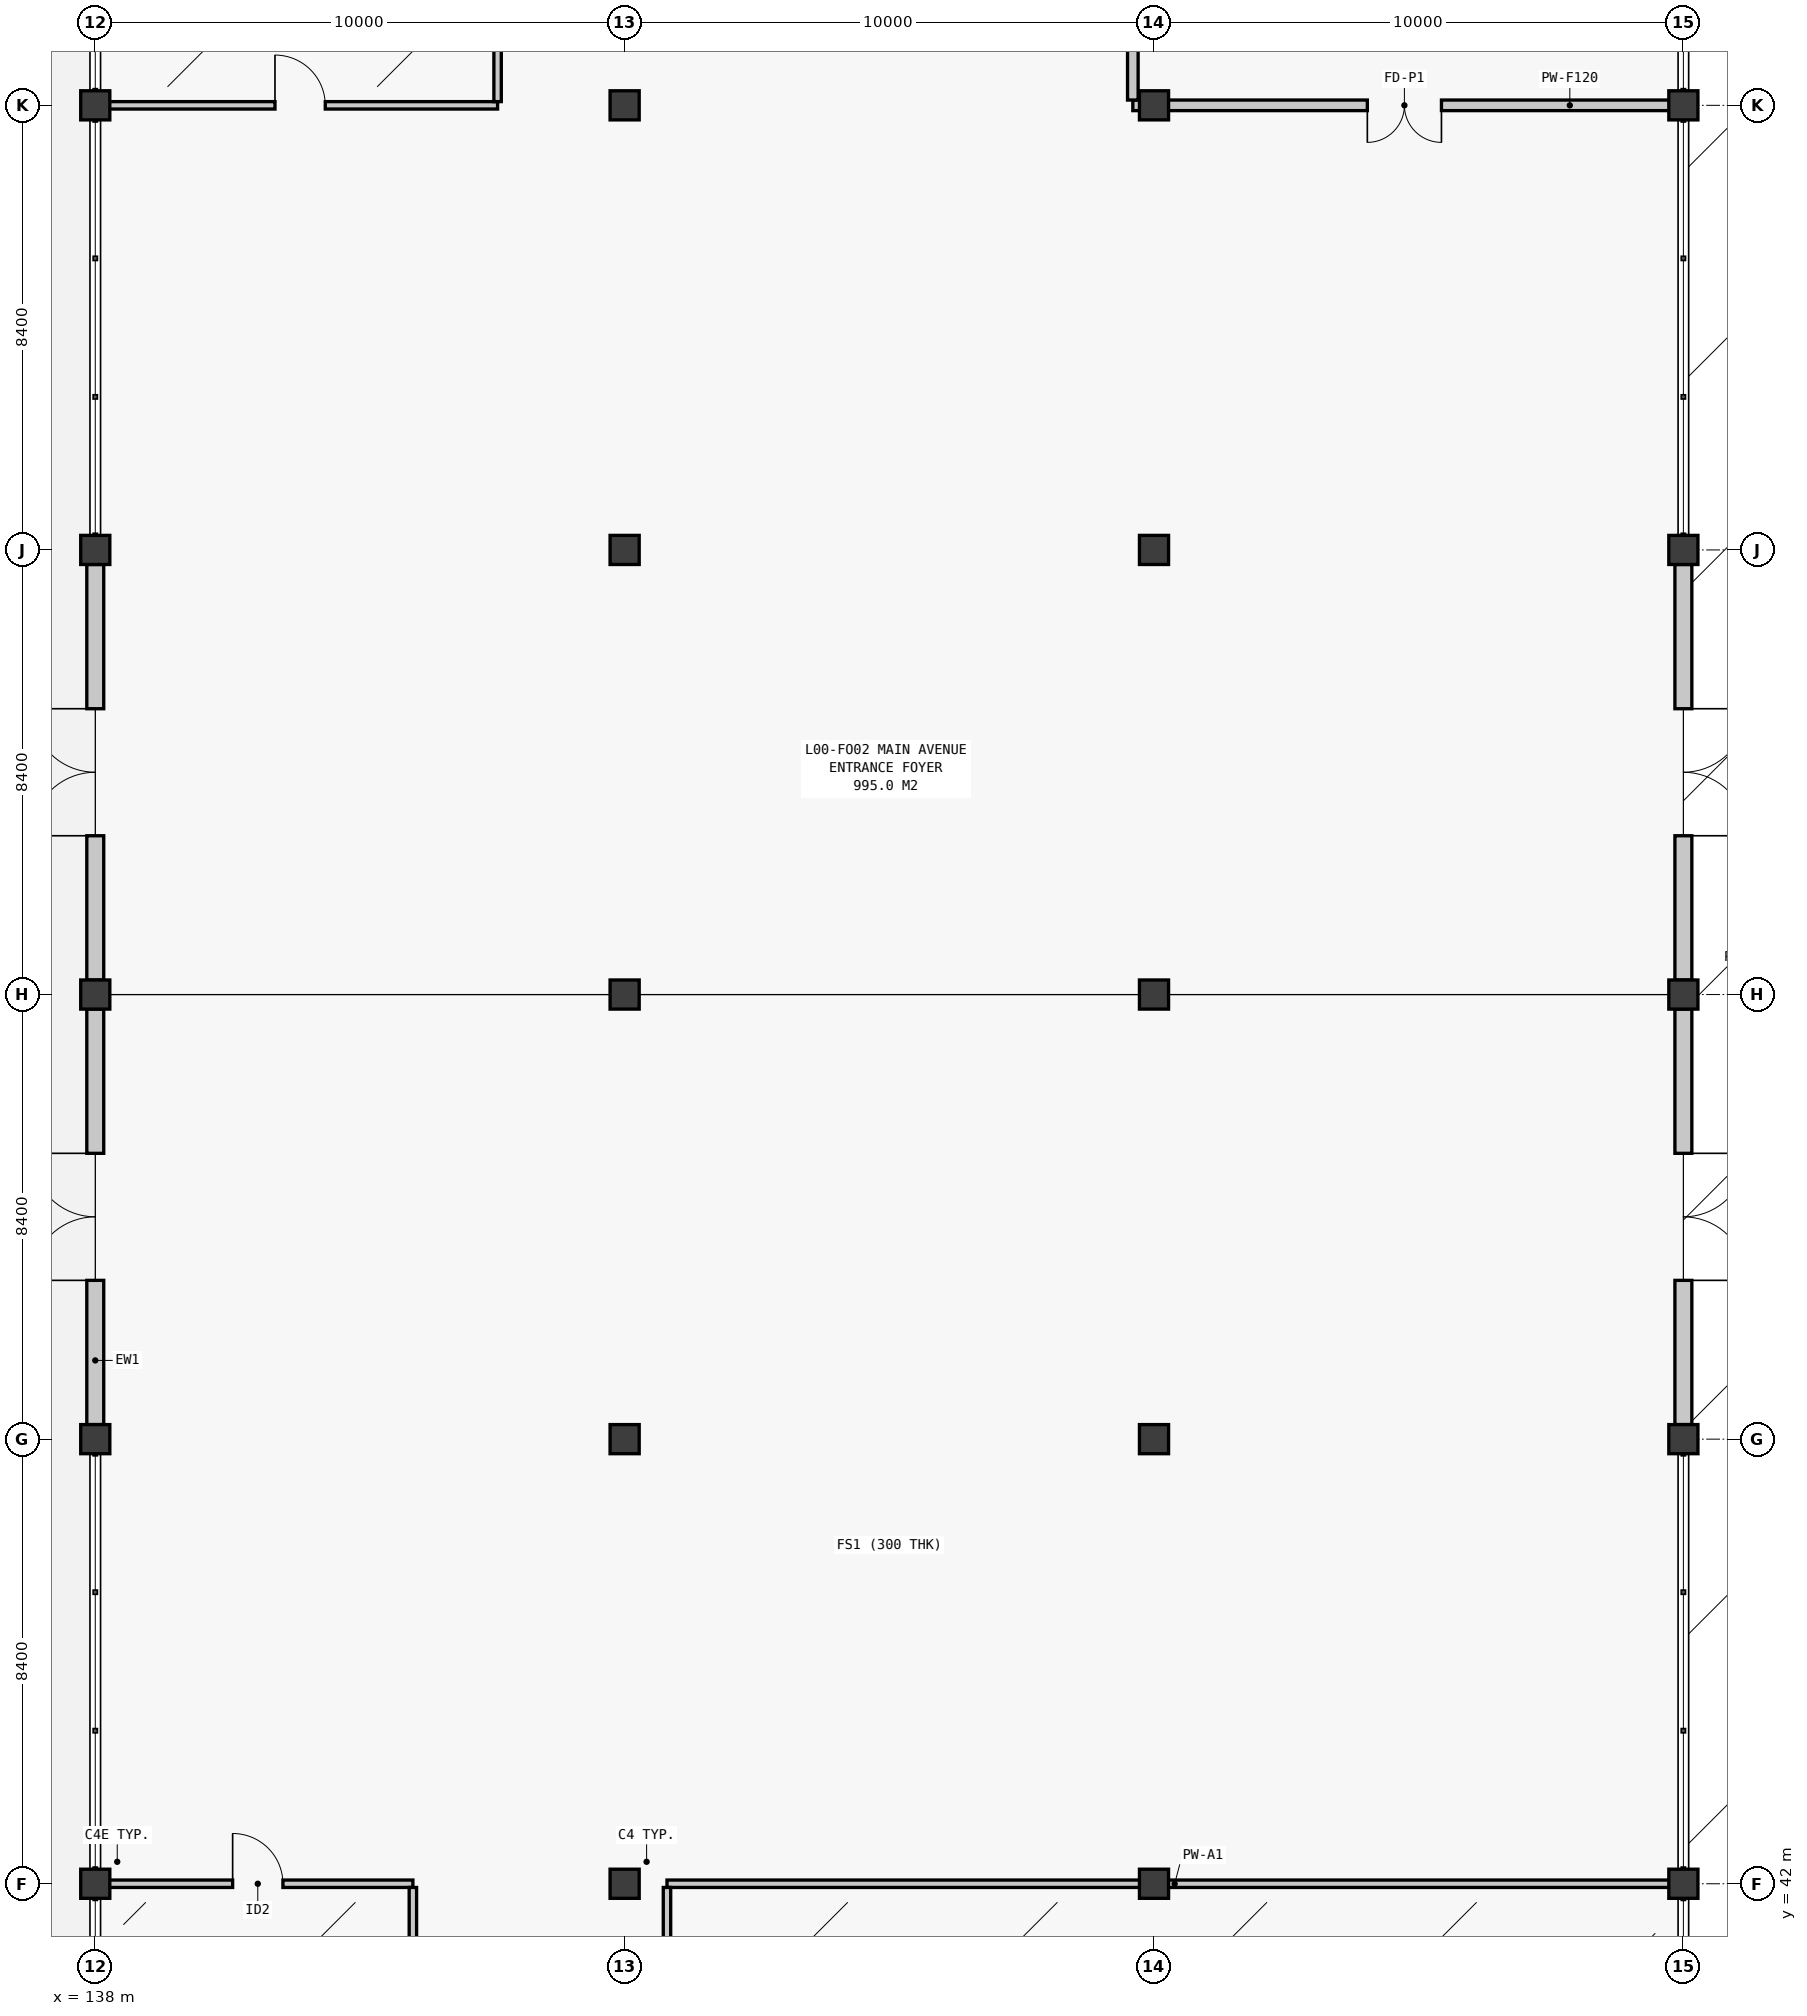
"""IFC4 building model, lengths in metres.
Left out: names, types, materials, properties, quantities, classifications, styles, units other than length and angle.
Written with IfcOpenShell. Run it as: python <this file> out.ifc"""

import sys

from ifc_helpers import new_model, si_unit, direction, frame, frame_2d, origin, origin_2d, place, context, subcontext, project, spatial, rectangle, extrude, element, fill, save


model = new_model("IFC4")
c1 = context("Model", 3, precision=1e-05, world=origin(), true_north=direction((0.0, 1.0)))
c2 = subcontext(c1, "Body", "Model", "MODEL_VIEW")
j1 = project(units=[si_unit("LENGTHUNIT", "METRE"), si_unit("PLANEANGLEUNIT", "RADIAN")], contexts=[c1])
p1 = place(None, origin())
s1 = spatial("IfcSite", under=j1, at=p1, CompositionType="ELEMENT")
p2 = place(p1, origin())
s2 = spatial("IfcBuilding", under=s1, at=p2, CompositionType="ELEMENT")
p3 = place(p2, origin())
s3 = spatial("IfcBuildingStorey", under=s2, at=p3, CompositionType="ELEMENT", Elevation=0.0)
for number, where, z_axis, x_axis in (
    (1, (138.0, 42.0, 0.0), (0.0, 0.0, 1.0), (1.0, 0.0, 0.0)),
    (2, (138.0, 50.4, 0.0), (0.0, 0.0, 1.0), (1.0, 0.0, 0.0)),
    (3, (138.0, 58.8, 0.0), (0.0, 0.0, 1.0), (1.0, 0.0, 0.0)),
    (4, (138.0, 67.2, 0.0), (0.0, 0.0, 1.0), (1.0, 0.0, 0.0)),
    (5, (138.0, 75.6, 0.0), (0.0, 0.0, 1.0), (1.0, 0.0, 0.0)),
    (6, (148.0, 42.0, 0.0), (0.0, 0.0, 1.0), (1.0, 0.0, 0.0)),
    (7, (148.0, 50.4, 0.0), (0.0, 0.0, 1.0), (1.0, 0.0, 0.0)),
    (8, (148.0, 58.8, 0.0), (0.0, 0.0, 1.0), (1.0, 0.0, 0.0)),
    (9, (148.0, 67.2, 0.0), (0.0, 0.0, 1.0), (1.0, 0.0, 0.0)),
    (10, (148.0, 75.6, 0.0), (0.0, 0.0, 1.0), (1.0, 0.0, 0.0)),
    (11, (158.0, 42.0, 0.0), (0.0, 0.0, 1.0), (1.0, 0.0, 0.0)),
    (12, (158.0, 50.4, 0.0), (0.0, 0.0, 1.0), (1.0, 0.0, 0.0)),
    (13, (158.0, 58.8, 0.0), (0.0, 0.0, 1.0), (1.0, 0.0, 0.0)),
    (14, (158.0, 67.2, 0.0), (0.0, 0.0, 1.0), (1.0, 0.0, 0.0)),
    (15, (158.0, 75.6, 0.0), (0.0, 0.0, 1.0), (1.0, 0.0, 0.0)),
    (16, (168.0, 42.0, 0.0), (0.0, 0.0, 1.0), (1.0, 0.0, 0.0)),
    (17, (168.0, 50.4, 0.0), (0.0, 0.0, 1.0), (1.0, 0.0, 0.0)),
    (18, (168.0, 58.8, 0.0), (0.0, 0.0, 1.0), (1.0, 0.0, 0.0)),
    (19, (168.0, 67.2, 0.0), (0.0, 0.0, 1.0), (1.0, 0.0, 0.0)),
    (20, (168.0, 75.6, 0.0), (0.0, 0.0, 1.0), (1.0, 0.0, 0.0)),
):
    element("IfcColumn", number, at=place(p3, frame(where, z_axis=z_axis, x_axis=x_axis)), inside=s3, PredefinedType="COLUMN", context=c2, shape_type="SweptSolid", body=[
        extrude(rectangle(XDim=0.55, YDim=0.55, at=origin_2d()), origin(), (0.0, 0.0, 1.0), 4.8),
    ])
p4 = place(p3, frame((138.0, 58.525, 0.0), z_axis=(0.0, 0.0, 1.0), x_axis=(0.0, -1.0, 0.0)))
e21 = element("IfcWall", 21, at=p4, inside=s3, PredefinedType="STANDARD", context=c2, shape_type="SweptSolid", body=[
    extrude(rectangle(XDim=7.85, YDim=0.32, at=frame_2d((3.925, 0.0))), origin(), (0.0, 0.0, 1.0), 3.976),
])
p5 = place(p4, frame((2.725, 0.0, 0.0)))
e22 = element("IfcOpeningElement", 22, at=p5, cuts=e21, PredefinedType="OPENING", context=c2, shape_type="SweptSolid", body=[
    extrude(rectangle(XDim=2.4, YDim=2.4, at=frame_2d((1.2, 1.2))), frame((0.0, 0.175, 0.0), z_axis=(0.0, -1.0, 0.0), x_axis=(1.0, 0.0, 0.0)), (0.0, 0.0, 1.0), 0.35),
])
p6 = place(p3, frame((168.0, 50.675, 0.0), z_axis=(0.0, 0.0, 1.0), x_axis=(0.0, 1.0, 0.0)))
e23 = element("IfcWall", 23, at=p6, inside=s3, PredefinedType="STANDARD", context=c2, shape_type="SweptSolid", body=[
    extrude(rectangle(XDim=7.85, YDim=0.32, at=frame_2d((3.925, 0.0))), origin(), (0.0, 0.0, 1.0), 3.976),
])
p7 = place(p6, frame((2.725, 0.0, 0.0)))
e24 = element("IfcOpeningElement", 24, at=p7, cuts=e23, PredefinedType="OPENING", context=c2, shape_type="SweptSolid", body=[
    extrude(rectangle(XDim=2.4, YDim=2.4, at=frame_2d((1.2, 1.2))), frame((0.0, 0.175, 0.0), z_axis=(0.0, -1.0, 0.0), x_axis=(1.0, 0.0, 0.0)), (0.0, 0.0, 1.0), 0.35),
])
p8 = place(p3, frame((138.0, 66.925, 0.0), z_axis=(0.0, 0.0, 1.0), x_axis=(0.0, -1.0, 0.0)))
e25 = element("IfcWall", 25, at=p8, inside=s3, PredefinedType="STANDARD", context=c2, shape_type="SweptSolid", body=[
    extrude(rectangle(XDim=7.85, YDim=0.32, at=frame_2d((3.925, 0.0))), origin(), (0.0, 0.0, 1.0), 3.976),
])
p9 = place(p8, frame((2.725, 0.0, 0.0)))
e26 = element("IfcOpeningElement", 26, at=p9, cuts=e25, PredefinedType="OPENING", context=c2, shape_type="SweptSolid", body=[
    extrude(rectangle(XDim=2.4, YDim=2.4, at=frame_2d((1.2, 1.2))), frame((0.0, 0.175, 0.0), z_axis=(0.0, -1.0, 0.0), x_axis=(1.0, 0.0, 0.0)), (0.0, 0.0, 1.0), 0.35),
])
p10 = place(p3, frame((168.0, 59.075, 0.0), z_axis=(0.0, 0.0, 1.0), x_axis=(0.0, 1.0, 0.0)))
e27 = element("IfcWall", 27, at=p10, inside=s3, PredefinedType="STANDARD", context=c2, shape_type="SweptSolid", body=[
    extrude(rectangle(XDim=7.85, YDim=0.32, at=frame_2d((3.925, 0.0))), origin(), (0.0, 0.0, 1.0), 3.976),
])
p11 = place(p10, frame((2.725, 0.0, 0.0)))
e28 = element("IfcOpeningElement", 28, at=p11, cuts=e27, PredefinedType="OPENING", context=c2, shape_type="SweptSolid", body=[
    extrude(rectangle(XDim=2.4, YDim=2.4, at=frame_2d((1.2, 1.2))), frame((0.0, 0.175, 0.0), z_axis=(0.0, -1.0, 0.0), x_axis=(1.0, 0.0, 0.0)), (0.0, 0.0, 1.0), 0.35),
])
p12 = place(p3, frame((138.02, 42.0, 0.0), z_axis=(0.0, 0.0, 1.0), x_axis=(1.0, 0.0, 0.0)))
e29 = element("IfcWall", 29, at=p12, inside=s3, PredefinedType="PARTITIONING", context=c2, shape_type="SweptSolid", body=[
    extrude(rectangle(XDim=5.98, YDim=0.14, at=frame_2d((2.99, 0.0))), origin(), (0.0, 0.0, 1.0), 3.904),
])
p13 = place(p12, frame((2.575, 0.0, 0.0)))
e30 = element("IfcOpeningElement", 30, at=p13, cuts=e29, PredefinedType="OPENING", context=c2, shape_type="SweptSolid", body=[
    extrude(rectangle(XDim=0.95, YDim=2.15, at=frame_2d((0.475, 1.075))), frame((0.0, 0.085, 0.0), z_axis=(0.0, -1.0, 0.0), x_axis=(1.0, 0.0, 0.0)), (0.0, 0.0, 1.0), 0.17),
])
p14 = place(p3, frame((144.0, 25.36, 0.0), z_axis=(0.0, 0.0, 1.0), x_axis=(0.0, 1.0, 0.0)))
e31 = element("IfcWall", 31, at=p14, inside=s3, PredefinedType="PARTITIONING", context=c2, shape_type="SweptSolid", body=[
    extrude(rectangle(XDim=16.57, YDim=0.14, at=frame_2d((8.285, 0.0))), origin(), (0.0, 0.0, 1.0), 3.904),
])
p15 = place(p3, frame((148.8, 42.0, 0.0), z_axis=(0.0, 0.0, 1.0), x_axis=(1.0, 0.0, 0.0)))
e32 = element("IfcWall", 32, at=p15, inside=s3, PredefinedType="PARTITIONING", context=c2, shape_type="SweptSolid", body=[
    extrude(rectangle(XDim=19.18, YDim=0.14, at=frame_2d((9.59, 0.0))), origin(), (0.0, 0.0, 1.0), 3.904),
])
p16 = place(p3, frame((148.8, 35.27, 0.0), z_axis=(0.0, 0.0, 1.0), x_axis=(0.0, 1.0, 0.0)))
e33 = element("IfcWall", 33, at=p16, inside=s3, PredefinedType="PARTITIONING", context=c2, shape_type="SweptSolid", body=[
    extrude(rectangle(XDim=6.66, YDim=0.14, at=frame_2d((3.33, 0.0))), origin(), (0.0, 0.0, 1.0), 4.52),
])
p17 = place(p3, frame((138.02, 75.6, 0.0), z_axis=(0.0, 0.0, 1.0), x_axis=(1.0, 0.0, 0.0)))
e34 = element("IfcWall", 34, at=p17, inside=s3, PredefinedType="PARTITIONING", context=c2, shape_type="SweptSolid", body=[
    extrude(rectangle(XDim=7.58, YDim=0.14, at=frame_2d((3.79, 0.0))), origin(), (0.0, 0.0, 1.0), 3.904),
])
p18 = place(p17, frame((3.375, 0.0, 0.0)))
e35 = element("IfcOpeningElement", 35, at=p18, cuts=e34, PredefinedType="OPENING", context=c2, shape_type="SweptSolid", body=[
    extrude(rectangle(XDim=0.95, YDim=2.15, at=frame_2d((0.475, 1.075))), frame((0.0, 0.085, 0.0), z_axis=(0.0, -1.0, 0.0), x_axis=(1.0, 0.0, 0.0)), (0.0, 0.0, 1.0), 0.17),
])
p19 = place(p3, frame((145.6, 75.67, 0.0), z_axis=(0.0, 0.0, 1.0), x_axis=(0.0, 1.0, 0.0)))
e36 = element("IfcWall", 36, at=p19, inside=s3, PredefinedType="PARTITIONING", context=c2, shape_type="SweptSolid", body=[
    extrude(rectangle(XDim=16.57, YDim=0.14, at=frame_2d((8.285, 0.0))), origin(), (0.0, 0.0, 1.0), 3.904),
])
p20 = place(p3, frame((157.6, 75.6, 0.0), z_axis=(0.0, 0.0, 1.0), x_axis=(1.0, 0.0, 0.0)))
e37 = element("IfcWall", 37, at=p20, inside=s3, PredefinedType="PARTITIONING", context=c2, shape_type="SweptSolid", body=[
    extrude(rectangle(XDim=10.38, YDim=0.2, at=frame_2d((5.19, 0.0))), origin(), (0.0, 0.0, 1.0), 3.904),
])
p21 = place(p20, frame((4.43, 0.0, 0.0)))
e38 = element("IfcOpeningElement", 38, at=p21, cuts=e37, PredefinedType="OPENING", context=c2, shape_type="SweptSolid", body=[
    extrude(rectangle(XDim=1.4, YDim=2.2, at=frame_2d((0.7, 1.1))), frame((0.0, 0.115, 0.0), z_axis=(0.0, -1.0, 0.0), x_axis=(1.0, 0.0, 0.0)), (0.0, 0.0, 1.0), 0.23),
])
p22 = place(p3, frame((157.6, 75.7, 0.0), z_axis=(0.0, 0.0, 1.0), x_axis=(0.0, 1.0, 0.0)))
e39 = element("IfcWall", 39, at=p22, inside=s3, PredefinedType="PARTITIONING", context=c2, shape_type="SweptSolid", body=[
    extrude(rectangle(XDim=10.08, YDim=0.2, at=frame_2d((5.04, 0.0))), origin(), (0.0, 0.0, 1.0), 3.904),
])
p23 = place(p5, frame((2.4, 0.0, 0.0), z_axis=(0.0, 0.0, 1.0), x_axis=(-1.0, 0.0, 0.0)))
e40 = element("IfcDoor", 40, at=p23, inside=s3, OperationType="DOUBLE_DOOR_SINGLE_SWING", PredefinedType="DOOR", context=c2, shape_type="SweptSolid", body=[
    extrude(rectangle(XDim=2.4, YDim=2.4, at=frame_2d((1.2, 1.2))), frame((0.0, 0.025, 0.0), z_axis=(0.0, -1.0, 0.0), x_axis=(1.0, 0.0, 0.0)), (0.0, 0.0, 1.0), 0.05),
])
fill(e22, e40)
p24 = place(p7, frame((2.4, 0.0, 0.0), z_axis=(0.0, 0.0, 1.0), x_axis=(-1.0, 0.0, 0.0)))
e41 = element("IfcDoor", 41, at=p24, inside=s3, OperationType="DOUBLE_DOOR_SINGLE_SWING", PredefinedType="DOOR", context=c2, shape_type="SweptSolid", body=[
    extrude(rectangle(XDim=2.4, YDim=2.4, at=frame_2d((1.2, 1.2))), frame((0.0, 0.025, 0.0), z_axis=(0.0, -1.0, 0.0), x_axis=(1.0, 0.0, 0.0)), (0.0, 0.0, 1.0), 0.05),
])
fill(e24, e41)
p25 = place(p9, frame((2.4, 0.0, 0.0), z_axis=(0.0, 0.0, 1.0), x_axis=(-1.0, 0.0, 0.0)))
e42 = element("IfcDoor", 42, at=p25, inside=s3, OperationType="DOUBLE_DOOR_SINGLE_SWING", PredefinedType="DOOR", context=c2, shape_type="SweptSolid", body=[
    extrude(rectangle(XDim=2.4, YDim=2.4, at=frame_2d((1.2, 1.2))), frame((0.0, 0.025, 0.0), z_axis=(0.0, -1.0, 0.0), x_axis=(1.0, 0.0, 0.0)), (0.0, 0.0, 1.0), 0.05),
])
fill(e26, e42)
p26 = place(p11, frame((2.4, 0.0, 0.0), z_axis=(0.0, 0.0, 1.0), x_axis=(-1.0, 0.0, 0.0)))
e43 = element("IfcDoor", 43, at=p26, inside=s3, OperationType="DOUBLE_DOOR_SINGLE_SWING", PredefinedType="DOOR", context=c2, shape_type="SweptSolid", body=[
    extrude(rectangle(XDim=2.4, YDim=2.4, at=frame_2d((1.2, 1.2))), frame((0.0, 0.025, 0.0), z_axis=(0.0, -1.0, 0.0), x_axis=(1.0, 0.0, 0.0)), (0.0, 0.0, 1.0), 0.05),
])
fill(e28, e43)
p27 = place(p13, origin())
e44 = element("IfcDoor", 44, at=p27, inside=s3, OperationType="SINGLE_SWING_LEFT", PredefinedType="DOOR", context=c2, shape_type="SweptSolid", body=[
    extrude(rectangle(XDim=0.95, YDim=2.15, at=frame_2d((0.475, 1.075))), frame((0.0, 0.025, 0.0), z_axis=(0.0, -1.0, 0.0), x_axis=(1.0, 0.0, 0.0)), (0.0, 0.0, 1.0), 0.05),
])
fill(e30, e44)
p28 = place(p18, origin())
e45 = element("IfcDoor", 45, at=p28, inside=s3, OperationType="SINGLE_SWING_LEFT", PredefinedType="DOOR", context=c2, shape_type="SweptSolid", body=[
    extrude(rectangle(XDim=0.95, YDim=2.15, at=frame_2d((0.475, 1.075))), frame((0.0, 0.025, 0.0), z_axis=(0.0, -1.0, 0.0), x_axis=(1.0, 0.0, 0.0)), (0.0, 0.0, 1.0), 0.05),
])
fill(e35, e45)
p29 = place(p21, frame((1.4, 0.0, 0.0), z_axis=(0.0, 0.0, 1.0), x_axis=(-1.0, 0.0, 0.0)))
e46 = element("IfcDoor", 46, at=p29, inside=s3, OperationType="DOUBLE_DOOR_SINGLE_SWING", PredefinedType="DOOR", context=c2, shape_type="SweptSolid", body=[
    extrude(rectangle(XDim=1.4, YDim=2.2, at=frame_2d((0.7, 1.1))), frame((0.0, 0.025, 0.0), z_axis=(0.0, -1.0, 0.0), x_axis=(1.0, 0.0, 0.0)), (0.0, 0.0, 1.0), 0.05),
])
fill(e38, e46)
save(model, sys.argv[1])
